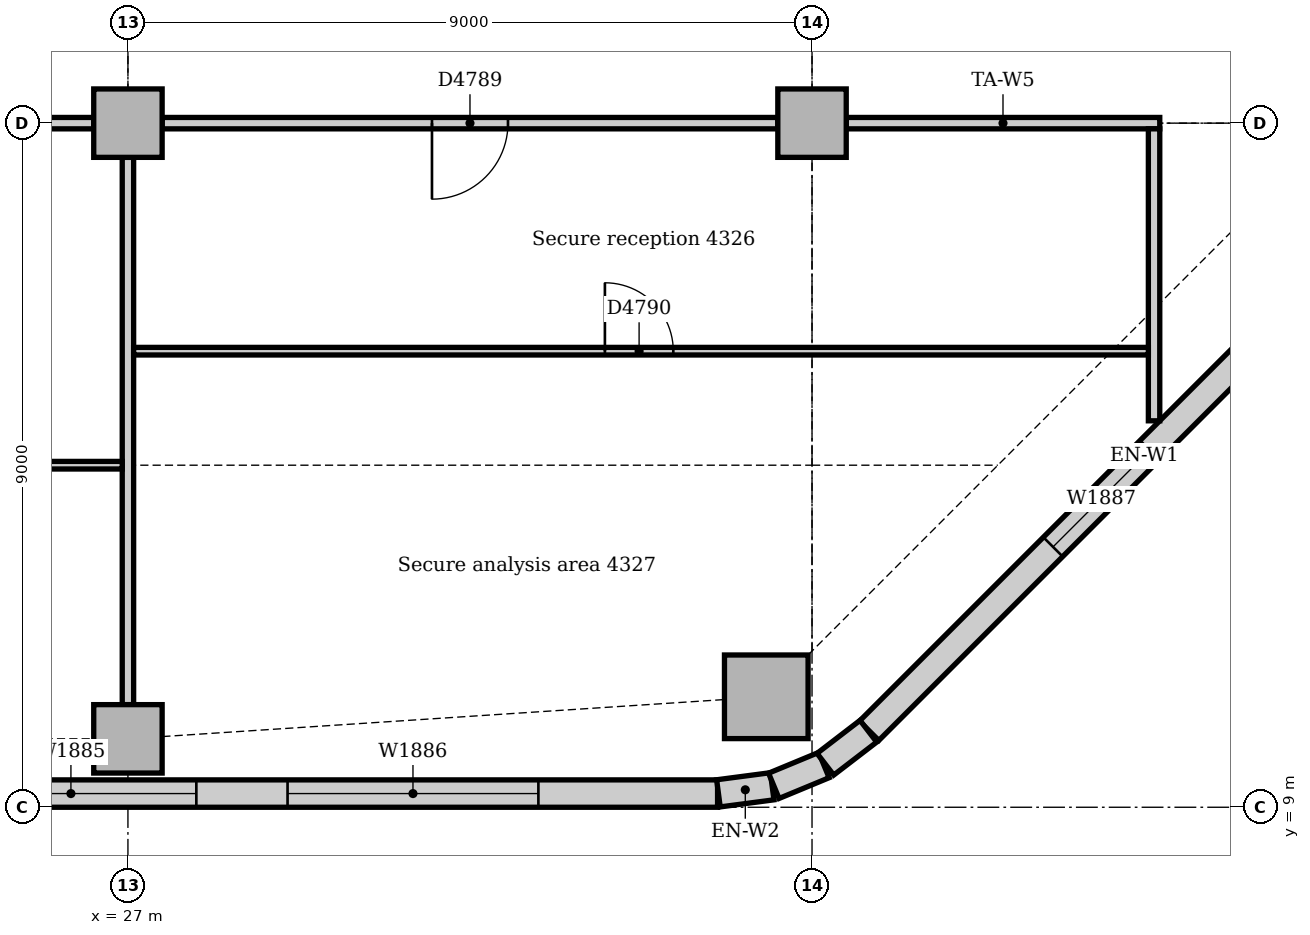
"""IFC4 building model, lengths in metres.
Left out: names, types, materials, properties, quantities, classifications, styles, units other than length and angle.
Written with IfcOpenShell. Run it as: python <this file> out.ifc"""

import sys

from ifc_helpers import new_model, si_unit, direction, frame, frame_2d, origin, origin_2d, place, context, subcontext, project, spatial, rectangle, extrude, element, fill, save


model = new_model("IFC4")
c1 = context("Model", 3, precision=1e-05, world=origin(), true_north=direction((0.0, 1.0)))
c2 = subcontext(c1, "Body", "Model", "MODEL_VIEW")
j1 = project(units=[si_unit("LENGTHUNIT", "METRE"), si_unit("PLANEANGLEUNIT", "RADIAN")], contexts=[c1])
p1 = place(None, origin())
s1 = spatial("IfcSite", under=j1, at=p1, CompositionType="ELEMENT")
p2 = place(p1, origin())
s2 = spatial("IfcBuilding", under=s1, at=p2, CompositionType="ELEMENT")
p3 = place(p2, frame((0.0, 0.0, 181.0)))
s3 = spatial("IfcBuildingStorey", under=s2, at=p3, CompositionType="ELEMENT", Elevation=181.0)
p4 = place(p3, frame((35.398, 10.453, 0.0), z_axis=(0.0, 0.0, 1.0), x_axis=(1.0, 0.0, 0.0)))
e1 = element("IfcColumn", 1, at=p4, inside=s3, PredefinedType="COLUMN", context=c2, shape_type="SweptSolid", body=[
    extrude(rectangle(XDim=1.1, YDim=1.1, at=origin_2d()), origin(), (0.0, 0.0, 1.0), 3.85),
])
for number, where, z_axis, x_axis in (
    (2, (27.0, 9.9, 0.0), (0.0, 0.0, 1.0), (1.0, 0.0, 0.0)),
    (3, (27.0, 18.0, 0.0), (0.0, 0.0, 1.0), (1.0, 0.0, 0.0)),
    (4, (36.0, 18.0, 0.0), (0.0, 0.0, 1.0), (1.0, 0.0, 0.0)),
):
    element("IfcColumn", number, at=place(p3, frame(where, z_axis=z_axis, x_axis=x_axis)), inside=s3, PredefinedType="COLUMN", context=c2, shape_type="SweptSolid", body=[
        extrude(rectangle(XDim=0.9, YDim=0.9, at=origin_2d()), origin(), (0.0, 0.0, 1.0), 3.85),
    ])
p5 = place(p3, frame((4.243, 9.18, 0.0), z_axis=(0.0, 0.0, 1.0), x_axis=(1.0, 0.0, 0.0)))
e5 = element("IfcWall", 5, at=p5, inside=s3, PredefinedType="STANDARD", context=c2, shape_type="SweptSolid", body=[
    extrude(rectangle(XDim=30.515, YDim=0.36, at=frame_2d((15.257, 0.0))), origin(), (0.0, 0.0, 1.0), 3.85),
])
p6 = place(p5, frame((2.707, 0.0, 0.9)))
e6 = element("IfcOpeningElement", 6, at=p6, cuts=e5, PredefinedType="OPENING", context=c2, shape_type="SweptSolid", body=[
    extrude(rectangle(XDim=3.3, YDim=1.6, at=frame_2d((1.65, 0.8))), frame((0.0, 0.19, 0.0), z_axis=(0.0, -1.0, 0.0), x_axis=(1.0, 0.0, 0.0)), (0.0, 0.0, 1.0), 0.38),
])
p7 = place(p5, frame((7.257, 0.0, 0.9)))
e7 = element("IfcOpeningElement", 7, at=p7, cuts=e5, PredefinedType="OPENING", context=c2, shape_type="SweptSolid", body=[
    extrude(rectangle(XDim=1.8, YDim=1.6, at=frame_2d((0.9, 0.8))), frame((0.0, 0.19, 0.0), z_axis=(0.0, -1.0, 0.0), x_axis=(1.0, 0.0, 0.0)), (0.0, 0.0, 1.0), 0.38),
])
p8 = place(p5, frame((11.357, 0.0, 0.9)))
e8 = element("IfcOpeningElement", 8, at=p8, cuts=e5, PredefinedType="OPENING", context=c2, shape_type="SweptSolid", body=[
    extrude(rectangle(XDim=3.3, YDim=1.6, at=frame_2d((1.65, 0.8))), frame((0.0, 0.19, 0.0), z_axis=(0.0, -1.0, 0.0), x_axis=(1.0, 0.0, 0.0)), (0.0, 0.0, 1.0), 0.38),
])
p9 = place(p5, frame((16.207, 0.0, 0.9)))
e9 = element("IfcOpeningElement", 9, at=p9, cuts=e5, PredefinedType="OPENING", context=c2, shape_type="SweptSolid", body=[
    extrude(rectangle(XDim=3.3, YDim=1.6, at=frame_2d((1.65, 0.8))), frame((0.0, 0.19, 0.0), z_axis=(0.0, -1.0, 0.0), x_axis=(1.0, 0.0, 0.0)), (0.0, 0.0, 1.0), 0.38),
])
p10 = place(p5, frame((20.357, 0.0, 0.9)))
e10 = element("IfcOpeningElement", 10, at=p10, cuts=e5, PredefinedType="OPENING", context=c2, shape_type="SweptSolid", body=[
    extrude(rectangle(XDim=3.3, YDim=1.6, at=frame_2d((1.65, 0.8))), frame((0.0, 0.19, 0.0), z_axis=(0.0, -1.0, 0.0), x_axis=(1.0, 0.0, 0.0)), (0.0, 0.0, 1.0), 0.38),
])
p11 = place(p5, frame((24.857, 0.0, 0.9)))
e11 = element("IfcOpeningElement", 11, at=p11, cuts=e5, PredefinedType="OPENING", context=c2, shape_type="SweptSolid", body=[
    extrude(rectangle(XDim=3.3, YDim=1.6, at=frame_2d((1.65, 0.8))), frame((0.0, 0.19, 0.0), z_axis=(0.0, -1.0, 0.0), x_axis=(1.0, 0.0, 0.0)), (0.0, 0.0, 1.0), 0.38),
])
p12 = place(p3, frame((36.751, 10.006, 0.0), z_axis=(0.0, 0.0, 1.0), x_axis=(0.707106781187, 0.707106781187, 0.0)))
e12 = element("IfcWall", 12, at=p12, inside=s3, PredefinedType="STANDARD", context=c2, shape_type="SweptSolid", body=[
    extrude(rectangle(XDim=10.243, YDim=0.36, at=frame_2d((5.121, 0.0))), origin(), (0.0, 0.0, 1.0), 3.85),
])
p13 = place(p12, frame((3.421, 0.0, 0.9)))
e13 = element("IfcOpeningElement", 13, at=p13, cuts=e12, PredefinedType="OPENING", context=c2, shape_type="SweptSolid", body=[
    extrude(rectangle(XDim=1.8, YDim=1.6, at=frame_2d((0.9, 0.8))), frame((0.0, 0.19, 0.0), z_axis=(0.0, -1.0, 0.0), x_axis=(1.0, 0.0, 0.0)), (0.0, 0.0, 1.0), 0.38),
])
for number, where, z_axis, x_axis in (
    (14, (34.769, 9.183, 0.0), (0.0, 0.0, 1.0), (0.991, 0.131, 0.0)),
    (15, (35.497, 9.282, 0.0), (0.0, 0.0, 1.0), (0.924, 0.383, 0.0)),
):
    element("IfcWall", number, at=place(p3, frame(where, z_axis=z_axis, x_axis=x_axis)), inside=s3, PredefinedType="STANDARD", context=c2, shape_type="SweptSolid", body=[
        extrude(rectangle(XDim=0.713, YDim=0.36, at=frame_2d((0.356, 0.0))), origin(), (0.0, 0.0, 1.0), 3.85),
    ])
p14 = place(p3, frame((36.175, 9.566, 0.0), z_axis=(0.0, 0.0, 1.0), x_axis=(0.793321924995, 0.608802368033, 0.0)))
e16 = element("IfcWall", 16, at=p14, inside=s3, PredefinedType="STANDARD", context=c2, shape_type="SweptSolid", body=[
    extrude(rectangle(XDim=0.713, YDim=0.36, at=frame_2d((0.357, 0.0))), origin(), (0.0, 0.0, 1.0), 3.85),
])
p15 = place(p3, frame((18.45, 18.0, 0.0), z_axis=(0.0, 0.0, 1.0), x_axis=(1.0, 0.0, 0.0)))
e17 = element("IfcWall", 17, at=p15, inside=s3, PredefinedType="PARTITIONING", context=c2, shape_type="SweptSolid", body=[
    extrude(rectangle(XDim=8.1, YDim=0.15, at=frame_2d((4.05, 0.0))), origin(), (0.0, 0.0, 1.0), 3.262),
])
p16 = place(p3, frame((27.45, 18.0, 0.0), z_axis=(0.0, 0.0, 1.0), x_axis=(1.0, 0.0, 0.0)))
e18 = element("IfcWall", 18, at=p16, inside=s3, PredefinedType="PARTITIONING", context=c2, shape_type="SweptSolid", body=[
    extrude(rectangle(XDim=8.1, YDim=0.15, at=frame_2d((4.05, 0.0))), origin(), (0.0, 0.0, 1.0), 3.262),
])
p17 = place(p16, frame((3.55, 0.0, 0.0)))
e19 = element("IfcOpeningElement", 19, at=p17, cuts=e18, PredefinedType="OPENING", context=c2, shape_type="SweptSolid", body=[
    extrude(rectangle(XDim=1.0, YDim=2.1, at=frame_2d((0.5, 1.05))), frame((0.0, 0.085, 0.0), z_axis=(0.0, -1.0, 0.0), x_axis=(1.0, 0.0, 0.0)), (0.0, 0.0, 1.0), 0.17),
])
p18 = place(p3, frame((36.45, 18.0, 0.0), z_axis=(0.0, 0.0, 1.0), x_axis=(1.0, 0.0, 0.0)))
e20 = element("IfcWall", 20, at=p18, inside=s3, PredefinedType="PARTITIONING", context=c2, shape_type="SweptSolid", body=[
    extrude(rectangle(XDim=4.125, YDim=0.15, at=frame_2d((2.062, 0.0))), origin(), (0.0, 0.0, 1.0), 3.35),
])
p19 = place(p3, frame((40.5, 14.084, 0.0), z_axis=(0.0, 0.0, 1.0), x_axis=(0.0, 1.0, 0.0)))
e21 = element("IfcWall", 21, at=p19, inside=s3, PredefinedType="PARTITIONING", context=c2, shape_type="SweptSolid", body=[
    extrude(rectangle(XDim=3.841, YDim=0.15, at=frame_2d((1.921, 0.0))), origin(), (0.0, 0.0, 1.0), 3.85),
])
p20 = place(p3, frame((27.0, 10.35, 0.0), z_axis=(0.0, 0.0, 1.0), x_axis=(0.0, 1.0, 0.0)))
e22 = element("IfcWall", 22, at=p20, inside=s3, PredefinedType="PARTITIONING", context=c2, shape_type="SweptSolid", body=[
    extrude(rectangle(XDim=7.2, YDim=0.15, at=frame_2d((3.6, 0.0))), origin(), (0.0, 0.0, 1.0), 3.362),
])
p21 = place(p3, frame((13.575, 13.5, 0.0), z_axis=(0.0, 0.0, 1.0), x_axis=(1.0, 0.0, 0.0)))
e23 = element("IfcWall", 23, at=p21, inside=s3, PredefinedType="PARTITIONING", context=c2, shape_type="SweptSolid", body=[
    extrude(rectangle(XDim=13.35, YDim=0.1, at=frame_2d((6.675, 0.0))), origin(), (0.0, 0.0, 1.0), 3.4),
])
p22 = place(p21, frame((2.95, 0.0, 0.0)))
e24 = element("IfcOpeningElement", 24, at=p22, cuts=e23, PredefinedType="OPENING", context=c2, shape_type="SweptSolid", body=[
    extrude(rectangle(XDim=0.9, YDim=2.1, at=frame_2d((0.45, 1.05))), frame((0.0, 0.06, 0.0), z_axis=(0.0, -1.0, 0.0), x_axis=(1.0, 0.0, 0.0)), (0.0, 0.0, 1.0), 0.12),
])
p23 = place(p21, frame((9.475, 0.0, 0.0)))
e25 = element("IfcOpeningElement", 25, at=p23, cuts=e23, PredefinedType="OPENING", context=c2, shape_type="SweptSolid", body=[
    extrude(rectangle(XDim=0.9, YDim=2.1, at=frame_2d((0.45, 1.05))), frame((0.0, 0.06, 0.0), z_axis=(0.0, -1.0, 0.0), x_axis=(1.0, 0.0, 0.0)), (0.0, 0.0, 1.0), 0.12),
])
p24 = place(p3, frame((27.075, 15.0, 0.0), z_axis=(0.0, 0.0, 1.0), x_axis=(1.0, 0.0, 0.0)))
e26 = element("IfcWall", 26, at=p24, inside=s3, PredefinedType="PARTITIONING", context=c2, shape_type="SweptSolid", body=[
    extrude(rectangle(XDim=13.35, YDim=0.1, at=frame_2d((6.675, 0.0))), origin(), (0.0, 0.0, 1.0), 3.85),
])
p25 = place(p24, frame((6.2, 0.0, 0.0)))
e27 = element("IfcOpeningElement", 27, at=p25, cuts=e26, PredefinedType="OPENING", context=c2, shape_type="SweptSolid", body=[
    extrude(rectangle(XDim=0.9, YDim=2.1, at=frame_2d((0.45, 1.05))), frame((0.0, 0.06, 0.0), z_axis=(0.0, -1.0, 0.0), x_axis=(1.0, 0.0, 0.0)), (0.0, 0.0, 1.0), 0.12),
])
p26 = place(p10, origin())
e28 = element("IfcWindow", 28, at=p26, inside=s3, PartitioningType="SINGLE_PANEL", PredefinedType="WINDOW", context=c2, shape_type="SweptSolid", body=[
    extrude(rectangle(XDim=3.3, YDim=1.6, at=frame_2d((1.65, 0.8))), frame((0.0, 0.13, 0.0), z_axis=(0.0, -1.0, 0.0), x_axis=(1.0, 0.0, 0.0)), (0.0, 0.0, 1.0), 0.06),
])
fill(e10, e28)
p27 = place(p11, origin())
e29 = element("IfcWindow", 29, at=p27, inside=s3, PartitioningType="SINGLE_PANEL", PredefinedType="WINDOW", context=c2, shape_type="SweptSolid", body=[
    extrude(rectangle(XDim=3.3, YDim=1.6, at=frame_2d((1.65, 0.8))), frame((0.0, 0.13, 0.0), z_axis=(0.0, -1.0, 0.0), x_axis=(1.0, 0.0, 0.0)), (0.0, 0.0, 1.0), 0.06),
])
fill(e11, e29)
p28 = place(p13, origin())
e30 = element("IfcWindow", 30, at=p28, inside=s3, PartitioningType="SINGLE_PANEL", PredefinedType="WINDOW", context=c2, shape_type="SweptSolid", body=[
    extrude(rectangle(XDim=1.8, YDim=1.6, at=frame_2d((0.9, 0.8))), frame((0.0, 0.13, 0.0), z_axis=(0.0, -1.0, 0.0), x_axis=(1.0, 0.0, 0.0)), (0.0, 0.0, 1.0), 0.06),
])
fill(e13, e30)
p29 = place(p17, frame((1.0, 0.0, 0.0), z_axis=(0.0, 0.0, 1.0), x_axis=(-1.0, 0.0, 0.0)))
e31 = element("IfcDoor", 31, at=p29, inside=s3, OperationType="SINGLE_SWING_RIGHT", PredefinedType="DOOR", context=c2, shape_type="SweptSolid", body=[
    extrude(rectangle(XDim=1.0, YDim=2.1, at=frame_2d((0.5, 1.05))), frame((0.0, 0.025, 0.0), z_axis=(0.0, -1.0, 0.0), x_axis=(1.0, 0.0, 0.0)), (0.0, 0.0, 1.0), 0.05),
])
fill(e19, e31)
p30 = place(p25, origin())
e32 = element("IfcDoor", 32, at=p30, inside=s3, OperationType="SINGLE_SWING_LEFT", PredefinedType="DOOR", context=c2, shape_type="SweptSolid", body=[
    extrude(rectangle(XDim=0.9, YDim=2.1, at=frame_2d((0.45, 1.05))), frame((0.0, 0.025, 0.0), z_axis=(0.0, -1.0, 0.0), x_axis=(1.0, 0.0, 0.0)), (0.0, 0.0, 1.0), 0.05),
])
fill(e27, e32)
save(model, sys.argv[1])
